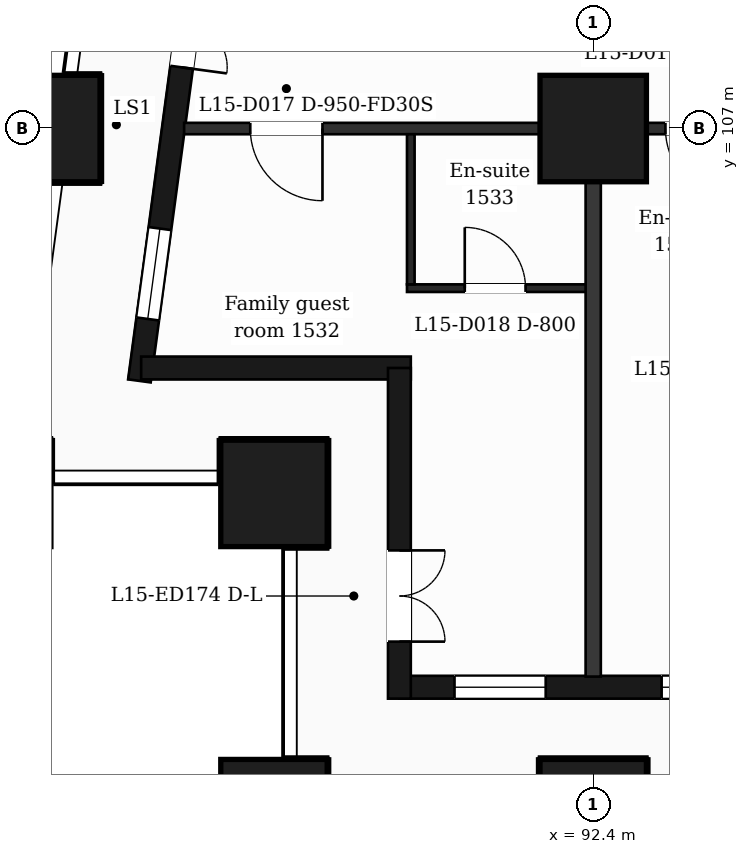
"""IFC4 building model, lengths in metres.
Left out: names, types, materials, properties, quantities, classifications, styles, units other than length and angle.
Written with IfcOpenShell. Run it as: python <this file> out.ifc"""

import sys

from ifc_helpers import new_model, si_unit, direction, frame, frame_2d, origin, origin_2d, place, context, subcontext, project, spatial, rectangle, extrude, element, fill, save


model = new_model("IFC4")
c1 = context("Model", 3, precision=1e-05, world=origin(), true_north=direction((0.0, 1.0)))
c2 = subcontext(c1, "Body", "Model", "MODEL_VIEW")
j1 = project(units=[si_unit("LENGTHUNIT", "METRE"), si_unit("PLANEANGLEUNIT", "RADIAN")], contexts=[c1])
p1 = place(None, origin())
s1 = spatial("IfcSite", under=j1, at=p1, CompositionType="ELEMENT")
p2 = place(p1, origin())
s2 = spatial("IfcBuilding", under=s1, at=p2, CompositionType="ELEMENT")
p3 = place(p2, frame((0.0, 0.0, 70.5)))
s3 = spatial("IfcBuildingStorey", under=s2, at=p3, CompositionType="ELEMENT", Elevation=70.5)
for number, where, z_axis, x_axis in (
    (1, (92.4, 98.0, 0.0), (0.0, 0.0, 1.0), (1.0, 0.0, 0.0)),
    (2, (88.2, 98.0, 0.0), (0.0, 0.0, 1.0), (1.0, 0.0, 0.0)),
    (3, (88.2, 102.2, 0.0), (0.0, 0.0, 1.0), (1.0, 0.0, 0.0)),
    (4, (92.4, 107.0, 0.0), (0.0, 0.0, 1.0), (1.0, 0.0, 0.0)),
    (5, (85.211, 107.0, 0.0), (0.0, 0.0, 1.0), (1.0, 0.0, 0.0)),
):
    element("IfcColumn", number, at=place(p3, frame(where, z_axis=z_axis, x_axis=x_axis)), inside=s3, PredefinedType="COLUMN", context=c2, shape_type="SweptSolid", body=[
        extrude(rectangle(XDim=1.4, YDim=1.4, at=origin_2d()), origin(), (0.0, 0.0, 1.0), 3.5),
    ])
p4 = place(p3, frame((89.85, 99.65, 0.0), z_axis=(0.0, 0.0, 1.0), x_axis=(1.0, 0.0, 0.0)))
e6 = element("IfcWall", 6, at=p4, inside=s3, PredefinedType="SOLIDWALL", context=c2, shape_type="SweptSolid", body=[
    extrude(rectangle(XDim=47.25, YDim=0.3, at=frame_2d((23.625, 0.0))), origin(), (0.0, 0.0, 1.0), 3.18),
])
p5 = place(p4, frame((0.725, 0.0, 0.9)))
e7 = element("IfcOpeningElement", 7, at=p5, cuts=e6, PredefinedType="OPENING", context=c2, shape_type="SweptSolid", body=[
    extrude(rectangle(XDim=1.2, YDim=2.1, at=frame_2d((0.6, 1.05))), frame((0.0, 0.16, 0.0), z_axis=(0.0, -1.0, 0.0), x_axis=(1.0, 0.0, 0.0)), (0.0, 0.0, 1.0), 0.32),
])
p6 = place(p4, frame((3.45, 0.0, 0.9)))
e8 = element("IfcOpeningElement", 8, at=p6, cuts=e6, PredefinedType="OPENING", context=c2, shape_type="SweptSolid", body=[
    extrude(rectangle(XDim=2.4, YDim=2.1, at=frame_2d((1.2, 1.05))), frame((0.0, 0.16, 0.0), z_axis=(0.0, -1.0, 0.0), x_axis=(1.0, 0.0, 0.0)), (0.0, 0.0, 1.0), 0.32),
])
p7 = place(p4, frame((7.35, 0.0, 0.0)))
e9 = element("IfcOpeningElement", 9, at=p7, cuts=e6, PredefinedType="OPENING", context=c2, shape_type="SweptSolid", body=[
    extrude(rectangle(XDim=1.2, YDim=2.4, at=frame_2d((0.6, 1.2))), frame((0.0, 0.16, 0.0), z_axis=(0.0, -1.0, 0.0), x_axis=(1.0, 0.0, 0.0)), (0.0, 0.0, 1.0), 0.32),
])
p8 = place(p4, frame((9.15, 0.0, 0.9)))
e10 = element("IfcOpeningElement", 10, at=p8, cuts=e6, PredefinedType="OPENING", context=c2, shape_type="SweptSolid", body=[
    extrude(rectangle(XDim=1.2, YDim=2.1, at=frame_2d((0.6, 1.05))), frame((0.0, 0.16, 0.0), z_axis=(0.0, -1.0, 0.0), x_axis=(1.0, 0.0, 0.0)), (0.0, 0.0, 1.0), 0.32),
])
p9 = place(p4, frame((11.85, 0.0, 0.9)))
e11 = element("IfcOpeningElement", 11, at=p9, cuts=e6, PredefinedType="OPENING", context=c2, shape_type="SweptSolid", body=[
    extrude(rectangle(XDim=2.4, YDim=2.1, at=frame_2d((1.2, 1.05))), frame((0.0, 0.16, 0.0), z_axis=(0.0, -1.0, 0.0), x_axis=(1.0, 0.0, 0.0)), (0.0, 0.0, 1.0), 0.32),
])
p10 = place(p4, frame((16.05, 0.0, 0.9)))
e12 = element("IfcOpeningElement", 12, at=p10, cuts=e6, PredefinedType="OPENING", context=c2, shape_type="SweptSolid", body=[
    extrude(rectangle(XDim=2.4, YDim=2.1, at=frame_2d((1.2, 1.05))), frame((0.0, 0.16, 0.0), z_axis=(0.0, -1.0, 0.0), x_axis=(1.0, 0.0, 0.0)), (0.0, 0.0, 1.0), 0.32),
])
p11 = place(p4, frame((20.85, 0.0, 0.9)))
e13 = element("IfcOpeningElement", 13, at=p11, cuts=e6, PredefinedType="OPENING", context=c2, shape_type="SweptSolid", body=[
    extrude(rectangle(XDim=1.2, YDim=2.1, at=frame_2d((0.6, 1.05))), frame((0.0, 0.16, 0.0), z_axis=(0.0, -1.0, 0.0), x_axis=(1.0, 0.0, 0.0)), (0.0, 0.0, 1.0), 0.32),
])
p12 = place(p4, frame((25.05, 0.0, 0.9)))
e14 = element("IfcOpeningElement", 14, at=p12, cuts=e6, PredefinedType="OPENING", context=c2, shape_type="SweptSolid", body=[
    extrude(rectangle(XDim=1.2, YDim=2.1, at=frame_2d((0.6, 1.05))), frame((0.0, 0.16, 0.0), z_axis=(0.0, -1.0, 0.0), x_axis=(1.0, 0.0, 0.0)), (0.0, 0.0, 1.0), 0.32),
])
p13 = place(p4, frame((28.65, 0.0, 0.9)))
e15 = element("IfcOpeningElement", 15, at=p13, cuts=e6, PredefinedType="OPENING", context=c2, shape_type="SweptSolid", body=[
    extrude(rectangle(XDim=2.4, YDim=2.1, at=frame_2d((1.2, 1.05))), frame((0.0, 0.16, 0.0), z_axis=(0.0, -1.0, 0.0), x_axis=(1.0, 0.0, 0.0)), (0.0, 0.0, 1.0), 0.32),
])
p14 = place(p4, frame((32.85, 0.0, 0.9)))
e16 = element("IfcOpeningElement", 16, at=p14, cuts=e6, PredefinedType="OPENING", context=c2, shape_type="SweptSolid", body=[
    extrude(rectangle(XDim=2.4, YDim=2.1, at=frame_2d((1.2, 1.05))), frame((0.0, 0.16, 0.0), z_axis=(0.0, -1.0, 0.0), x_axis=(1.0, 0.0, 0.0)), (0.0, 0.0, 1.0), 0.32),
])
p15 = place(p4, frame((37.05, 0.0, 0.9)))
e17 = element("IfcOpeningElement", 17, at=p15, cuts=e6, PredefinedType="OPENING", context=c2, shape_type="SweptSolid", body=[
    extrude(rectangle(XDim=2.4, YDim=2.1, at=frame_2d((1.2, 1.05))), frame((0.0, 0.16, 0.0), z_axis=(0.0, -1.0, 0.0), x_axis=(1.0, 0.0, 0.0)), (0.0, 0.0, 1.0), 0.32),
])
p16 = place(p4, frame((41.25, 0.0, 0.9)))
e18 = element("IfcOpeningElement", 18, at=p16, cuts=e6, PredefinedType="OPENING", context=c2, shape_type="SweptSolid", body=[
    extrude(rectangle(XDim=2.4, YDim=2.1, at=frame_2d((1.2, 1.05))), frame((0.0, 0.16, 0.0), z_axis=(0.0, -1.0, 0.0), x_axis=(1.0, 0.0, 0.0)), (0.0, 0.0, 1.0), 0.32),
])
p17 = place(p4, frame((45.25, 0.0, 0.9)))
e19 = element("IfcOpeningElement", 19, at=p17, cuts=e6, PredefinedType="OPENING", context=c2, shape_type="SweptSolid", body=[
    extrude(rectangle(XDim=1.2, YDim=2.1, at=frame_2d((0.6, 1.05))), frame((0.0, 0.16, 0.0), z_axis=(0.0, -1.0, 0.0), x_axis=(1.0, 0.0, 0.0)), (0.0, 0.0, 1.0), 0.32),
])
p18 = place(p3, frame((87.334, 110.4, 0.0), z_axis=(0.0, 0.0, 1.0), x_axis=(-0.133437175554, -0.991057273915, 0.0)))
e20 = element("IfcWall", 20, at=p18, inside=s3, PredefinedType="SOLIDWALL", context=c2, shape_type="SweptSolid", body=[
    extrude(rectangle(XDim=6.781, YDim=0.3, at=frame_2d((3.39, 0.0))), origin(), (0.0, 0.0, 1.0), 3.18),
])
p19 = place(p18, frame((1.418, 0.0, 0.0)))
e21 = element("IfcOpeningElement", 21, at=p19, cuts=e20, PredefinedType="OPENING", context=c2, shape_type="SweptSolid", body=[
    extrude(rectangle(XDim=1.2, YDim=2.4, at=frame_2d((0.6, 1.2))), frame((0.0, 0.16, 0.0), z_axis=(0.0, -1.0, 0.0), x_axis=(1.0, 0.0, 0.0)), (0.0, 0.0, 1.0), 0.32),
])
p20 = place(p18, frame((4.758, 0.0, 0.9)))
e22 = element("IfcOpeningElement", 22, at=p20, cuts=e20, PredefinedType="OPENING", context=c2, shape_type="SweptSolid", body=[
    extrude(rectangle(XDim=1.2, YDim=2.1, at=frame_2d((0.6, 1.05))), frame((0.0, 0.16, 0.0), z_axis=(0.0, -1.0, 0.0), x_axis=(1.0, 0.0, 0.0)), (0.0, 0.0, 1.0), 0.32),
])
p21 = place(p3, frame((86.452, 103.85, 0.0), z_axis=(0.0, 0.0, 1.0), x_axis=(1.0, 0.0, 0.0)))
e23 = element("IfcWall", 23, at=p21, inside=s3, PredefinedType="SOLIDWALL", context=c2, shape_type="SweptSolid", body=[
    extrude(rectangle(XDim=3.548, YDim=0.3, at=frame_2d((1.774, 0.0))), origin(), (0.0, 0.0, 1.0), 3.18),
])
p22 = place(p3, frame((89.85, 103.85, 0.0), z_axis=(0.0, 0.0, 1.0), x_axis=(0.0, -1.0, 0.0)))
e24 = element("IfcWall", 24, at=p22, inside=s3, PredefinedType="SOLIDWALL", context=c2, shape_type="SweptSolid", body=[
    extrude(rectangle(XDim=4.35, YDim=0.3, at=frame_2d((2.175, 0.0))), origin(), (0.0, 0.0, 1.0), 3.18),
])
p23 = place(p22, frame((2.4, 0.0, 0.0)))
e25 = element("IfcOpeningElement", 25, at=p23, cuts=e24, PredefinedType="OPENING", context=c2, shape_type="SweptSolid", body=[
    extrude(rectangle(XDim=1.2, YDim=2.4, at=frame_2d((0.6, 1.2))), frame((0.0, 0.16, 0.0), z_axis=(0.0, -1.0, 0.0), x_axis=(1.0, 0.0, 0.0)), (0.0, 0.0, 1.0), 0.32),
])
p24 = place(p3, frame((89.95, 104.9, 0.0), z_axis=(0.0, 0.0, 1.0), x_axis=(1.0, 0.0, 0.0)))
e26 = element("IfcWall", 26, at=p24, inside=s3, PredefinedType="PARTITIONING", context=c2, shape_type="SweptSolid", body=[
    extrude(rectangle(XDim=2.45, YDim=0.1, at=frame_2d((1.225, 0.0))), origin(), (0.0, 0.0, 1.0), 3.18),
])
p25 = place(p24, frame((0.76, 0.0, 0.0)))
e27 = element("IfcOpeningElement", 27, at=p25, cuts=e26, PredefinedType="OPENING", context=c2, shape_type="SweptSolid", body=[
    extrude(rectangle(XDim=0.8, YDim=2.1, at=frame_2d((0.4, 1.05))), frame((0.0, 0.06, 0.0), z_axis=(0.0, -1.0, 0.0), x_axis=(1.0, 0.0, 0.0)), (0.0, 0.0, 1.0), 0.12),
])
p26 = place(p3, frame((87.018, 107.0, 0.0), z_axis=(0.0, 0.0, 1.0), x_axis=(1.0, 0.0, 0.0)))
e28 = element("IfcWall", 28, at=p26, inside=s3, PredefinedType="PARTITIONING", context=c2, shape_type="SweptSolid", body=[
    extrude(rectangle(XDim=52.765, YDim=0.15, at=frame_2d((26.382, 0.0))), origin(), (0.0, 0.0, 1.0), 3.18),
])
p27 = place(p26, frame((0.87, 0.0, 0.0)))
e29 = element("IfcOpeningElement", 29, at=p27, cuts=e28, PredefinedType="OPENING", context=c2, shape_type="SweptSolid", body=[
    extrude(rectangle(XDim=0.95, YDim=2.1, at=frame_2d((0.475, 1.05))), frame((0.0, 0.085, 0.0), z_axis=(0.0, -1.0, 0.0), x_axis=(1.0, 0.0, 0.0)), (0.0, 0.0, 1.0), 0.17),
])
p28 = place(p26, frame((6.332, 0.0, 0.0)))
e30 = element("IfcOpeningElement", 30, at=p28, cuts=e28, PredefinedType="OPENING", context=c2, shape_type="SweptSolid", body=[
    extrude(rectangle(XDim=0.95, YDim=2.1, at=frame_2d((0.475, 1.05))), frame((0.0, 0.085, 0.0), z_axis=(0.0, -1.0, 0.0), x_axis=(1.0, 0.0, 0.0)), (0.0, 0.0, 1.0), 0.17),
])
p29 = place(p26, frame((11.882, 0.0, 0.0)))
e31 = element("IfcOpeningElement", 31, at=p29, cuts=e28, PredefinedType="OPENING", context=c2, shape_type="SweptSolid", body=[
    extrude(rectangle(XDim=0.95, YDim=2.1, at=frame_2d((0.475, 1.05))), frame((0.0, 0.085, 0.0), z_axis=(0.0, -1.0, 0.0), x_axis=(1.0, 0.0, 0.0)), (0.0, 0.0, 1.0), 0.17),
])
p30 = place(p26, frame((16.757, 0.0, 0.0)))
e32 = element("IfcOpeningElement", 32, at=p30, cuts=e28, PredefinedType="OPENING", context=c2, shape_type="SweptSolid", body=[
    extrude(rectangle(XDim=0.95, YDim=2.1, at=frame_2d((0.475, 1.05))), frame((0.0, 0.085, 0.0), z_axis=(0.0, -1.0, 0.0), x_axis=(1.0, 0.0, 0.0)), (0.0, 0.0, 1.0), 0.17),
])
p31 = place(p26, frame((20.319, 0.0, 0.0)))
e33 = element("IfcOpeningElement", 33, at=p31, cuts=e28, PredefinedType="OPENING", context=c2, shape_type="SweptSolid", body=[
    extrude(rectangle(XDim=0.95, YDim=2.1, at=frame_2d((0.475, 1.05))), frame((0.0, 0.085, 0.0), z_axis=(0.0, -1.0, 0.0), x_axis=(1.0, 0.0, 0.0)), (0.0, 0.0, 1.0), 0.17),
])
p32 = place(p26, frame((23.132, 0.0, 0.0)))
e34 = element("IfcOpeningElement", 34, at=p32, cuts=e28, PredefinedType="OPENING", context=c2, shape_type="SweptSolid", body=[
    extrude(rectangle(XDim=0.95, YDim=2.1, at=frame_2d((0.475, 1.05))), frame((0.0, 0.085, 0.0), z_axis=(0.0, -1.0, 0.0), x_axis=(1.0, 0.0, 0.0)), (0.0, 0.0, 1.0), 0.17),
])
p33 = place(p26, frame((26.657, 0.0, 0.0)))
e35 = element("IfcOpeningElement", 35, at=p33, cuts=e28, PredefinedType="OPENING", context=c2, shape_type="SweptSolid", body=[
    extrude(rectangle(XDim=0.95, YDim=2.1, at=frame_2d((0.475, 1.05))), frame((0.0, 0.085, 0.0), z_axis=(0.0, -1.0, 0.0), x_axis=(1.0, 0.0, 0.0)), (0.0, 0.0, 1.0), 0.17),
])
p34 = place(p26, frame((34.952, 0.0, 0.0)))
e36 = element("IfcOpeningElement", 36, at=p34, cuts=e28, PredefinedType="OPENING", context=c2, shape_type="SweptSolid", body=[
    extrude(rectangle(XDim=1.0, YDim=2.1, at=frame_2d((0.5, 1.05))), frame((0.0, 0.085, 0.0), z_axis=(0.0, -1.0, 0.0), x_axis=(1.0, 0.0, 0.0)), (0.0, 0.0, 1.0), 0.17),
])
p35 = place(p26, frame((45.062, 0.0, 0.0)))
e37 = element("IfcOpeningElement", 37, at=p35, cuts=e28, PredefinedType="OPENING", context=c2, shape_type="SweptSolid", body=[
    extrude(rectangle(XDim=0.95, YDim=2.1, at=frame_2d((0.475, 1.05))), frame((0.0, 0.085, 0.0), z_axis=(0.0, -1.0, 0.0), x_axis=(1.0, 0.0, 0.0)), (0.0, 0.0, 1.0), 0.17),
])
p36 = place(p26, frame((49.285, 0.0, 0.0)))
e38 = element("IfcOpeningElement", 38, at=p36, cuts=e28, PredefinedType="OPENING", context=c2, shape_type="SweptSolid", body=[
    extrude(rectangle(XDim=0.95, YDim=2.1, at=frame_2d((0.475, 1.05))), frame((0.0, 0.085, 0.0), z_axis=(0.0, -1.0, 0.0), x_axis=(1.0, 0.0, 0.0)), (0.0, 0.0, 1.0), 0.17),
])
p37 = place(p3, frame((90.0, 104.95, 0.0), z_axis=(0.0, 0.0, 1.0), x_axis=(0.0, 1.0, 0.0)))
e39 = element("IfcWall", 39, at=p37, inside=s3, PredefinedType="PARTITIONING", context=c2, shape_type="SweptSolid", body=[
    extrude(rectangle(XDim=1.975, YDim=0.1, at=frame_2d((0.988, 0.0))), origin(), (0.0, 0.0, 1.0), 3.18),
])
p38 = place(p3, frame((92.4, 99.79, 0.0), z_axis=(0.0, 0.0, 1.0), x_axis=(0.0, 1.0, 0.0)))
e40 = element("IfcWall", 40, at=p38, inside=s3, PredefinedType="PARTITIONING", context=c2, shape_type="SweptSolid", body=[
    extrude(rectangle(XDim=7.135, YDim=0.2, at=frame_2d((3.567, 0.0))), origin(), (0.0, 0.0, 1.0), 3.18),
])
p39 = place(p5, origin())
e41 = element("IfcWindow", 41, at=p39, inside=s3, PartitioningType="SINGLE_PANEL", PredefinedType="WINDOW", context=c2, shape_type="SweptSolid", body=[
    extrude(rectangle(XDim=1.2, YDim=2.1, at=frame_2d((0.6, 1.05))), frame((0.0, 0.03, 0.0), z_axis=(0.0, -1.0, 0.0), x_axis=(1.0, 0.0, 0.0)), (0.0, 0.0, 1.0), 0.06),
])
fill(e7, e41)
p40 = place(p6, origin())
e42 = element("IfcWindow", 42, at=p40, inside=s3, PartitioningType="SINGLE_PANEL", PredefinedType="WINDOW", context=c2, shape_type="SweptSolid", body=[
    extrude(rectangle(XDim=2.4, YDim=2.1, at=frame_2d((1.2, 1.05))), frame((0.0, 0.03, 0.0), z_axis=(0.0, -1.0, 0.0), x_axis=(1.0, 0.0, 0.0)), (0.0, 0.0, 1.0), 0.06),
])
fill(e8, e42)
p41 = place(p19, origin())
e43 = element("IfcDoor", 43, at=p41, inside=s3, OperationType="DOUBLE_DOOR_SINGLE_SWING", PredefinedType="DOOR", context=c2, shape_type="SweptSolid", body=[
    extrude(rectangle(XDim=1.2, YDim=2.4, at=frame_2d((0.6, 1.2))), frame((0.0, 0.025, 0.0), z_axis=(0.0, -1.0, 0.0), x_axis=(1.0, 0.0, 0.0)), (0.0, 0.0, 1.0), 0.05),
])
fill(e21, e43)
p42 = place(p20, origin())
e44 = element("IfcWindow", 44, at=p42, inside=s3, PartitioningType="SINGLE_PANEL", PredefinedType="WINDOW", context=c2, shape_type="SweptSolid", body=[
    extrude(rectangle(XDim=1.2, YDim=2.1, at=frame_2d((0.6, 1.05))), frame((0.0, 0.03, 0.0), z_axis=(0.0, -1.0, 0.0), x_axis=(1.0, 0.0, 0.0)), (0.0, 0.0, 1.0), 0.06),
])
fill(e22, e44)
p43 = place(p23, origin())
e45 = element("IfcDoor", 45, at=p43, inside=s3, OperationType="DOUBLE_DOOR_SINGLE_SWING", PredefinedType="DOOR", context=c2, shape_type="SweptSolid", body=[
    extrude(rectangle(XDim=1.2, YDim=2.4, at=frame_2d((0.6, 1.2))), frame((0.0, 0.025, 0.0), z_axis=(0.0, -1.0, 0.0), x_axis=(1.0, 0.0, 0.0)), (0.0, 0.0, 1.0), 0.05),
])
fill(e25, e45)
p44 = place(p27, origin())
e46 = element("IfcDoor", 46, at=p44, inside=s3, OperationType="SINGLE_SWING_RIGHT", PredefinedType="DOOR", context=c2, shape_type="SweptSolid", body=[
    extrude(rectangle(XDim=0.95, YDim=2.1, at=frame_2d((0.475, 1.05))), frame((0.0, 0.025, 0.0), z_axis=(0.0, -1.0, 0.0), x_axis=(1.0, 0.0, 0.0)), (0.0, 0.0, 1.0), 0.05),
])
fill(e29, e46)
p45 = place(p25, origin())
e47 = element("IfcDoor", 47, at=p45, inside=s3, OperationType="SINGLE_SWING_LEFT", PredefinedType="DOOR", context=c2, shape_type="SweptSolid", body=[
    extrude(rectangle(XDim=0.8, YDim=2.1, at=frame_2d((0.4, 1.05))), frame((0.0, 0.025, 0.0), z_axis=(0.0, -1.0, 0.0), x_axis=(1.0, 0.0, 0.0)), (0.0, 0.0, 1.0), 0.05),
])
fill(e27, e47)
p46 = place(p28, origin())
e48 = element("IfcDoor", 48, at=p46, inside=s3, OperationType="SINGLE_SWING_RIGHT", PredefinedType="DOOR", context=c2, shape_type="SweptSolid", body=[
    extrude(rectangle(XDim=0.95, YDim=2.1, at=frame_2d((0.475, 1.05))), frame((0.0, 0.025, 0.0), z_axis=(0.0, -1.0, 0.0), x_axis=(1.0, 0.0, 0.0)), (0.0, 0.0, 1.0), 0.05),
])
fill(e30, e48)
save(model, sys.argv[1])
